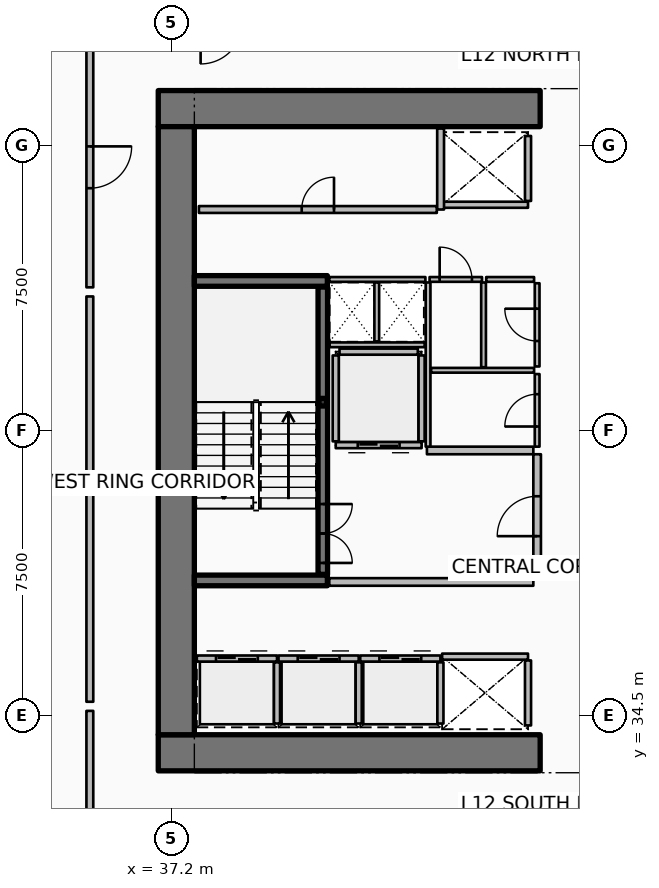
"""IFC4 building model, lengths in metres.
Left out: names, types, materials, properties, quantities, classifications, styles, units other than length and angle.
Written with IfcOpenShell. Run it as: python <this file> out.ifc"""

import sys

from ifc_helpers import new_model, si_unit, direction, frame, frame_2d, origin, origin_2d, place, context, subcontext, project, spatial, rectangle, hollow_rectangle, extrude, element, fill, save


model = new_model("IFC4")
c1 = context("Model", 3, precision=1e-05, world=origin(), true_north=direction((0.0, 1.0)))
c2 = subcontext(c1, "Body", "Model", "MODEL_VIEW")
j1 = project(units=[si_unit("LENGTHUNIT", "METRE"), si_unit("PLANEANGLEUNIT", "RADIAN")], contexts=[c1])
p1 = place(None, origin())
s1 = spatial("IfcSite", under=j1, at=p1, CompositionType="ELEMENT")
p2 = place(p1, origin())
s2 = spatial("IfcBuilding", under=s1, at=p2, CompositionType="ELEMENT")
p3 = place(p2, frame((0.0, 0.0, 52.65)))
s3 = spatial("IfcBuildingStorey", under=s2, at=p3, CompositionType="ELEMENT", Elevation=52.65)
for number, where, z_axis, x_axis in (
    (1, (36.85, 33.525, 0.0), (0.0, 0.0, 1.0), (1.0, 0.0, 0.0)),
    (2, (36.85, 50.475, 0.0), (0.0, 0.0, 1.0), (1.0, 0.0, 0.0)),
):
    element("IfcWall", number, at=place(p3, frame(where, z_axis=z_axis, x_axis=x_axis)), inside=s3, PredefinedType="SHEAR", context=c2, shape_type="SweptSolid", body=[
        extrude(rectangle(XDim=10.05, YDim=0.95, at=frame_2d((5.025, 0.0))), origin(), (0.0, 0.0, 1.0), 3.75),
    ])
p4 = place(p3, frame((37.325, 34.0, 0.0), z_axis=(0.0, 0.0, 1.0), x_axis=(0.0, 1.0, 0.0)))
e3 = element("IfcWall", 3, at=p4, inside=s3, PredefinedType="SHEAR", context=c2, shape_type="SweptSolid", body=[
    extrude(rectangle(XDim=16.0, YDim=0.95, at=frame_2d((8.0, 0.0))), origin(), (0.0, 0.0, 1.0), 3.75),
])
for number, where, z_axis, x_axis in (
    (4, (37.8, 38.06, 0.0), (0.0, 0.0, 1.0), (1.0, 0.0, 0.0)),
    (5, (37.8, 45.94, 0.0), (0.0, 0.0, 1.0), (1.0, 0.0, 0.0)),
):
    element("IfcWall", number, at=place(p3, frame(where, z_axis=z_axis, x_axis=x_axis)), inside=s3, PredefinedType="SHEAR", context=c2, shape_type="SweptSolid", body=[
        extrude(rectangle(XDim=3.5, YDim=0.28, at=frame_2d((1.75, 0.0))), origin(), (0.0, 0.0, 1.0), 3.75),
    ])
p5 = place(p3, frame((41.18, 42.75, 0.0), z_axis=(0.0, 0.0, 1.0), x_axis=(1.0, 0.0, 0.0)))
e6 = element("IfcColumn", 6, at=p5, inside=s3, PredefinedType="COLUMN", context=c2, shape_type="SweptSolid", body=[
    extrude(hollow_rectangle(XDim=0.2, YDim=0.2, WallThickness=0.01, InnerFilletRadius=0.01, OuterFilletRadius=0.02, at=origin_2d()), origin(), (0.0, 0.0, 1.0), 1.67),
])
p6 = place(p3, frame((41.18, 38.22, 0.0), z_axis=(0.0, 0.0, 1.0), x_axis=(0.0, 1.0, 0.0)))
e7 = element("IfcWall", 7, at=p6, inside=s3, PredefinedType="SOLIDWALL", context=c2, shape_type="SweptSolid", body=[
    extrude(rectangle(XDim=7.56, YDim=0.25, at=frame_2d((3.78, 0.0))), origin(), (0.0, 0.0, 1.0), 3.5),
])
p7 = place(p6, frame((0.3, 0.0, 0.0)))
e8 = element("IfcOpeningElement", 8, at=p7, cuts=e7, PredefinedType="OPENING", context=c2, shape_type="SweptSolid", body=[
    extrude(rectangle(XDim=1.55, YDim=2.15, at=frame_2d((0.775, 1.075))), frame((0.0, 0.135, 0.0), z_axis=(0.0, -1.0, 0.0), x_axis=(1.0, 0.0, 0.0)), (0.0, 0.0, 1.0), 0.27),
])
p8 = place(p3, frame((37.865, 36.005, 0.0), z_axis=(0.0, 0.0, 1.0), x_axis=(1.0, 0.0, 0.0)))
e9 = element("IfcWall", 9, at=p8, inside=s3, PredefinedType="PARTITIONING", context=c2, shape_type="SweptSolid", body=[
    extrude(rectangle(XDim=2.11, YDim=0.16, at=frame_2d((1.055, 0.0))), origin(), (0.0, 0.0, 1.0), 3.5),
])
p9 = place(p8, frame((0.505, 0.0, 0.0)))
e10 = element("IfcOpeningElement", 10, at=p9, cuts=e9, PredefinedType="OPENING", context=c2, shape_type="SweptSolid", body=[
    extrude(rectangle(XDim=1.1, YDim=2.1, at=frame_2d((0.55, 1.05))), frame((0.0, 0.09, 0.0), z_axis=(0.0, -1.0, 0.0), x_axis=(1.0, 0.0, 0.0)), (0.0, 0.0, 1.0), 0.18),
])
p10 = place(p3, frame((39.975, 34.295, 0.0), z_axis=(0.0, 0.0, 1.0), x_axis=(0.0, 1.0, 0.0)))
e11 = element("IfcWall", 11, at=p10, inside=s3, PredefinedType="PARTITIONING", context=c2, shape_type="SweptSolid", body=[
    extrude(rectangle(XDim=1.61, YDim=0.16, at=frame_2d((0.805, 0.0))), origin(), (0.0, 0.0, 1.0), 3.5),
])
p11 = place(p3, frame((40.015, 36.005, 0.0), z_axis=(0.0, 0.0, 1.0), x_axis=(1.0, 0.0, 0.0)))
e12 = element("IfcWall", 12, at=p11, inside=s3, PredefinedType="PARTITIONING", context=c2, shape_type="SweptSolid", body=[
    extrude(rectangle(XDim=2.11, YDim=0.16, at=frame_2d((1.055, 0.0))), origin(), (0.0, 0.0, 1.0), 3.5),
])
p12 = place(p11, frame((0.505, 0.0, 0.0)))
e13 = element("IfcOpeningElement", 13, at=p12, cuts=e12, PredefinedType="OPENING", context=c2, shape_type="SweptSolid", body=[
    extrude(rectangle(XDim=1.1, YDim=2.1, at=frame_2d((0.55, 1.05))), frame((0.0, 0.09, 0.0), z_axis=(0.0, -1.0, 0.0), x_axis=(1.0, 0.0, 0.0)), (0.0, 0.0, 1.0), 0.18),
])
p13 = place(p3, frame((42.125, 34.295, 0.0), z_axis=(0.0, 0.0, 1.0), x_axis=(0.0, 1.0, 0.0)))
e14 = element("IfcWall", 14, at=p13, inside=s3, PredefinedType="PARTITIONING", context=c2, shape_type="SweptSolid", body=[
    extrude(rectangle(XDim=1.61, YDim=0.16, at=frame_2d((0.805, 0.0))), origin(), (0.0, 0.0, 1.0), 3.5),
])
p14 = place(p3, frame((42.165, 36.005, 0.0), z_axis=(0.0, 0.0, 1.0), x_axis=(1.0, 0.0, 0.0)))
e15 = element("IfcWall", 15, at=p14, inside=s3, PredefinedType="PARTITIONING", context=c2, shape_type="SweptSolid", body=[
    extrude(rectangle(XDim=2.11, YDim=0.16, at=frame_2d((1.055, 0.0))), origin(), (0.0, 0.0, 1.0), 3.5),
])
p15 = place(p14, frame((0.505, 0.0, 0.0)))
e16 = element("IfcOpeningElement", 16, at=p15, cuts=e15, PredefinedType="OPENING", context=c2, shape_type="SweptSolid", body=[
    extrude(rectangle(XDim=1.1, YDim=2.1, at=frame_2d((0.55, 1.05))), frame((0.0, 0.09, 0.0), z_axis=(0.0, -1.0, 0.0), x_axis=(1.0, 0.0, 0.0)), (0.0, 0.0, 1.0), 0.18),
])
p16 = place(p3, frame((44.275, 34.295, 0.0), z_axis=(0.0, 0.0, 1.0), x_axis=(0.0, 1.0, 0.0)))
e17 = element("IfcWall", 17, at=p16, inside=s3, PredefinedType="PARTITIONING", context=c2, shape_type="SweptSolid", body=[
    extrude(rectangle(XDim=1.61, YDim=0.16, at=frame_2d((0.805, 0.0))), origin(), (0.0, 0.0, 1.0), 3.5),
])
p17 = place(p3, frame((46.58, 47.945, 0.0), z_axis=(0.0, 0.0, 1.0), x_axis=(-1.0, 0.0, 0.0)))
e18 = element("IfcWall", 18, at=p17, inside=s3, PredefinedType="PARTITIONING", context=c2, shape_type="SweptSolid", body=[
    extrude(rectangle(XDim=2.26, YDim=0.16, at=frame_2d((1.13, 0.0))), origin(), (0.0, 0.0, 1.0), 3.5),
])
p18 = place(p3, frame((46.58, 48.045, 0.0), z_axis=(0.0, 0.0, 1.0), x_axis=(0.0, 1.0, 0.0)))
e19 = element("IfcWall", 19, at=p18, inside=s3, PredefinedType="PARTITIONING", context=c2, shape_type="SweptSolid", body=[
    extrude(rectangle(XDim=1.71, YDim=0.16, at=frame_2d((0.855, 0.0))), origin(), (0.0, 0.0, 1.0), 3.5),
])
p19 = place(p3, frame((44.32, 36.055, 0.0), z_axis=(0.0, 0.0, 1.0), x_axis=(1.0, 0.0, 0.0)))
e20 = element("IfcWall", 20, at=p19, inside=s3, PredefinedType="PARTITIONING", context=c2, shape_type="SweptSolid", body=[
    extrude(rectangle(XDim=2.26, YDim=0.16, at=frame_2d((1.13, 0.0))), origin(), (0.0, 0.0, 1.0), 3.5),
])
p20 = place(p3, frame((46.58, 34.245, 0.0), z_axis=(0.0, 0.0, 1.0), x_axis=(0.0, 1.0, 0.0)))
e21 = element("IfcWall", 21, at=p20, inside=s3, PredefinedType="PARTITIONING", context=c2, shape_type="SweptSolid", body=[
    extrude(rectangle(XDim=1.71, YDim=0.16, at=frame_2d((0.855, 0.0))), origin(), (0.0, 0.0, 1.0), 3.5),
])
p21 = place(p3, frame((43.78, 41.62, 0.0), z_axis=(0.0, 0.0, 1.0), x_axis=(-1.0, 0.0, 0.0)))
e22 = element("IfcWall", 22, at=p21, inside=s3, PredefinedType="PARTITIONING", context=c2, shape_type="SweptSolid", body=[
    extrude(rectangle(XDim=2.26, YDim=0.16, at=frame_2d((1.13, 0.0))), origin(), (0.0, 0.0, 1.0), 3.5),
])
p22 = place(p21, frame((0.58, 0.0, 0.0)))
e23 = element("IfcOpeningElement", 23, at=p22, cuts=e22, PredefinedType="OPENING", context=c2, shape_type="SweptSolid", body=[
    extrude(rectangle(XDim=1.1, YDim=2.1, at=frame_2d((0.55, 1.05))), frame((0.0, 0.09, 0.0), z_axis=(0.0, -1.0, 0.0), x_axis=(1.0, 0.0, 0.0)), (0.0, 0.0, 1.0), 0.18),
])
for number, where, z_axis, x_axis in (
    (24, (43.78, 41.72, 0.0), (0.0, 0.0, 1.0), (0.0, 1.0, 0.0)),
    (25, (41.52, 41.72, 0.0), (0.0, 0.0, 1.0), (0.0, 1.0, 0.0)),
):
    element("IfcWall", number, at=place(p3, frame(where, z_axis=z_axis, x_axis=x_axis)), inside=s3, PredefinedType="PARTITIONING", context=c2, shape_type="SweptSolid", body=[
        extrude(rectangle(XDim=2.26, YDim=0.16, at=frame_2d((1.13, 0.0))), origin(), (0.0, 0.0, 1.0), 3.5),
    ])
p23 = place(p3, frame((41.62, 44.08, 0.0), z_axis=(0.0, 0.0, 1.0), x_axis=(1.0, 0.0, 0.0)))
e26 = element("IfcWall", 26, at=p23, inside=s3, PredefinedType="PARTITIONING", context=c2, shape_type="SweptSolid", body=[
    extrude(rectangle(XDim=2.06, YDim=0.16, at=frame_2d((1.03, 0.0))), origin(), (0.0, 0.0, 1.0), 3.5),
])
p24 = place(p3, frame((37.92, 47.82, 0.0), z_axis=(0.0, 0.0, 1.0), x_axis=(1.0, 0.0, 0.0)))
e27 = element("IfcWall", 27, at=p24, inside=s3, PredefinedType="PARTITIONING", context=c2, shape_type="SweptSolid", body=[
    extrude(rectangle(XDim=6.26, YDim=0.18, at=frame_2d((3.13, 0.0))), origin(), (0.0, 0.0, 1.0), 3.5),
])
p25 = place(p24, frame((2.705, 0.0, 0.0)))
e28 = element("IfcOpeningElement", 28, at=p25, cuts=e27, PredefinedType="OPENING", context=c2, shape_type="SweptSolid", body=[
    extrude(rectangle(XDim=0.85, YDim=2.06, at=frame_2d((0.425, 1.03))), frame((0.0, 0.1, 0.0), z_axis=(0.0, -1.0, 0.0), x_axis=(1.0, 0.0, 0.0)), (0.0, 0.0, 1.0), 0.2),
])
p26 = place(p3, frame((44.28, 47.82, 0.0), z_axis=(0.0, 0.0, 1.0), x_axis=(0.0, 1.0, 0.0)))
e29 = element("IfcWall", 29, at=p26, inside=s3, PredefinedType="PARTITIONING", context=c2, shape_type="SweptSolid", body=[
    extrude(rectangle(XDim=2.13, YDim=0.18, at=frame_2d((1.065, 0.0))), origin(), (0.0, 0.0, 1.0), 3.5),
])
p27 = place(p3, frame((41.35, 38.02, 0.0), z_axis=(0.0, 0.0, 1.0), x_axis=(1.0, 0.0, 0.0)))
e30 = element("IfcWall", 30, at=p27, inside=s3, PredefinedType="PARTITIONING", context=c2, shape_type="SweptSolid", body=[
    extrude(rectangle(XDim=5.37, YDim=0.2, at=frame_2d((2.685, 0.0))), origin(), (0.0, 0.0, 1.0), 3.5),
])
p28 = place(p3, frame((43.92, 41.48, 0.0), z_axis=(0.0, 0.0, 1.0), x_axis=(1.0, 0.0, 0.0)))
e31 = element("IfcWall", 31, at=p28, inside=s3, PredefinedType="PARTITIONING", context=c2, shape_type="SweptSolid", body=[
    extrude(rectangle(XDim=2.8, YDim=0.2, at=frame_2d((1.4, 0.0))), origin(), (0.0, 0.0, 1.0), 3.5),
])
p29 = place(p3, frame((46.82, 38.12, 0.0), z_axis=(0.0, 0.0, 1.0), x_axis=(0.0, 1.0, 0.0)))
e32 = element("IfcWall", 32, at=p29, inside=s3, PredefinedType="PARTITIONING", context=c2, shape_type="SweptSolid", body=[
    extrude(rectangle(XDim=3.26, YDim=0.2, at=frame_2d((1.63, 0.0))), origin(), (0.0, 0.0, 1.0), 3.5),
])
p30 = place(p29, frame((1.105, 0.0, 0.0)))
e33 = element("IfcOpeningElement", 33, at=p30, cuts=e32, PredefinedType="OPENING", context=c2, shape_type="SweptSolid", body=[
    extrude(rectangle(XDim=1.05, YDim=2.1, at=frame_2d((0.525, 1.05))), frame((0.0, 0.11, 0.0), z_axis=(0.0, -1.0, 0.0), x_axis=(1.0, 0.0, 0.0)), (0.0, 0.0, 1.0), 0.22),
])
p31 = place(p3, frame((41.36, 44.26, 0.0), z_axis=(0.0, 0.0, 1.0), x_axis=(1.0, 0.0, 0.0)))
e34 = element("IfcWall", 34, at=p31, inside=s3, PredefinedType="PARTITIONING", context=c2, shape_type="SweptSolid", body=[
    extrude(rectangle(XDim=2.5, YDim=0.125, at=frame_2d((1.25, 0.0))), origin(), (0.0, 0.0, 1.0), 2.94),
])
p32 = place(p3, frame((42.6, 44.35, 0.0), z_axis=(0.0, 0.0, 1.0), x_axis=(0.0, 1.0, 0.0)))
e35 = element("IfcWall", 35, at=p32, inside=s3, PredefinedType="PARTITIONING", context=c2, shape_type="SweptSolid", body=[
    extrude(rectangle(XDim=1.55, YDim=0.125, at=frame_2d((0.775, 0.0))), origin(), (0.0, 0.0, 1.0), 2.94),
])
p33 = place(p3, frame((43.95, 41.58, 0.0), z_axis=(0.0, 0.0, 1.0), x_axis=(0.0, 1.0, 0.0)))
e36 = element("IfcWall", 36, at=p33, inside=s3, PredefinedType="PARTITIONING", context=c2, shape_type="SweptSolid", body=[
    extrude(rectangle(XDim=4.32, YDim=0.125, at=frame_2d((2.16, 0.0))), origin(), (0.0, 0.0, 1.0), 2.94),
])
p34 = place(p3, frame((44.03, 43.59, 0.0), z_axis=(0.0, 0.0, 1.0), x_axis=(1.0, 0.0, 0.0)))
e37 = element("IfcWall", 37, at=p34, inside=s3, PredefinedType="PARTITIONING", context=c2, shape_type="SweptSolid", body=[
    extrude(rectangle(XDim=2.71, YDim=0.125, at=frame_2d((1.355, 0.0))), origin(), (0.0, 0.0, 1.0), 2.94),
])
p35 = place(p3, frame((45.41, 43.67, 0.0), z_axis=(0.0, 0.0, 1.0), x_axis=(0.0, 1.0, 0.0)))
e38 = element("IfcWall", 38, at=p35, inside=s3, PredefinedType="PARTITIONING", context=c2, shape_type="SweptSolid", body=[
    extrude(rectangle(XDim=2.23, YDim=0.125, at=frame_2d((1.115, 0.0))), origin(), (0.0, 0.0, 1.0), 2.94),
])
p36 = place(p3, frame((46.82, 41.58, 0.0), z_axis=(0.0, 0.0, 1.0), x_axis=(0.0, 1.0, 0.0)))
e39 = element("IfcWall", 39, at=p36, inside=s3, PredefinedType="PARTITIONING", context=c2, shape_type="SweptSolid", body=[
    extrude(rectangle(XDim=1.91, YDim=0.125, at=frame_2d((0.955, 0.0))), origin(), (0.0, 0.0, 1.0), 2.94),
])
p37 = place(p36, frame((0.53, 0.0, 0.0)))
e40 = element("IfcOpeningElement", 40, at=p37, cuts=e39, PredefinedType="OPENING", context=c2, shape_type="SweptSolid", body=[
    extrude(rectangle(XDim=0.85, YDim=2.06, at=frame_2d((0.425, 1.03))), frame((0.0, 0.073, 0.0), z_axis=(0.0, -1.0, 0.0), x_axis=(1.0, 0.0, 0.0)), (0.0, 0.0, 1.0), 0.145),
])
p38 = place(p3, frame((46.82, 43.69, 0.0), z_axis=(0.0, 0.0, 1.0), x_axis=(0.0, 1.0, 0.0)))
e41 = element("IfcWall", 41, at=p38, inside=s3, PredefinedType="PARTITIONING", context=c2, shape_type="SweptSolid", body=[
    extrude(rectangle(XDim=2.19, YDim=0.125, at=frame_2d((1.095, 0.0))), origin(), (0.0, 0.0, 1.0), 2.94),
])
p39 = place(p38, frame((0.67, 0.0, 0.0)))
e42 = element("IfcOpeningElement", 42, at=p39, cuts=e41, PredefinedType="OPENING", context=c2, shape_type="SweptSolid", body=[
    extrude(rectangle(XDim=0.85, YDim=2.06, at=frame_2d((0.425, 1.03))), frame((0.0, 0.073, 0.0), z_axis=(0.0, -1.0, 0.0), x_axis=(1.0, 0.0, 0.0)), (0.0, 0.0, 1.0), 0.145),
])
p40 = place(p3, frame((41.35, 45.98, 0.0), z_axis=(0.0, 0.0, 1.0), x_axis=(1.0, 0.0, 0.0)))
e43 = element("IfcWall", 43, at=p40, inside=s3, PredefinedType="PARTITIONING", context=c2, shape_type="SweptSolid", body=[
    extrude(rectangle(XDim=2.53, YDim=0.125, at=frame_2d((1.265, 0.0))), origin(), (0.0, 0.0, 1.0), 2.94),
])
p41 = place(p3, frame((43.99, 45.98, 0.0), z_axis=(0.0, 0.0, 1.0), x_axis=(1.0, 0.0, 0.0)))
e44 = element("IfcWall", 44, at=p41, inside=s3, PredefinedType="PARTITIONING", context=c2, shape_type="SweptSolid", body=[
    extrude(rectangle(XDim=1.38, YDim=0.125, at=frame_2d((0.69, 0.0))), origin(), (0.0, 0.0, 1.0), 2.94),
])
p42 = place(p41, frame((0.265, 0.0, 0.0)))
e45 = element("IfcOpeningElement", 45, at=p42, cuts=e44, PredefinedType="OPENING", context=c2, shape_type="SweptSolid", body=[
    extrude(rectangle(XDim=0.85, YDim=2.06, at=frame_2d((0.425, 1.03))), frame((0.0, 0.073, 0.0), z_axis=(0.0, -1.0, 0.0), x_axis=(1.0, 0.0, 0.0)), (0.0, 0.0, 1.0), 0.145),
])
p43 = place(p3, frame((45.48, 45.98, 0.0), z_axis=(0.0, 0.0, 1.0), x_axis=(1.0, 0.0, 0.0)))
e46 = element("IfcWall", 46, at=p43, inside=s3, PredefinedType="PARTITIONING", context=c2, shape_type="SweptSolid", body=[
    extrude(rectangle(XDim=1.26, YDim=0.125, at=frame_2d((0.63, 0.0))), origin(), (0.0, 0.0, 1.0), 2.94),
])
p44 = place(p3, frame((35.05, 52.089, 0.0), z_axis=(0.0, 0.0, 1.0), x_axis=(0.0, -1.0, 0.0)))
e47 = element("IfcWall", 47, at=p44, inside=s3, PredefinedType="PARTITIONING", context=c2, shape_type="SweptSolid", body=[
    extrude(rectangle(XDim=6.317, YDim=0.18, at=frame_2d((3.158, 0.0))), origin(), (0.0, 0.0, 1.0), 2.867),
])
p45 = place(p44, frame((2.608, 0.0, 0.0)))
e48 = element("IfcOpeningElement", 48, at=p45, cuts=e47, PredefinedType="OPENING", context=c2, shape_type="SweptSolid", body=[
    extrude(rectangle(XDim=1.1, YDim=2.1, at=frame_2d((0.55, 1.05))), frame((0.0, 0.1, 0.0), z_axis=(0.0, -1.0, 0.0), x_axis=(1.0, 0.0, 0.0)), (0.0, 0.0, 1.0), 0.2),
])
p46 = place(p3, frame((35.05, 45.532, 0.0), z_axis=(0.0, 0.0, 1.0), x_axis=(0.0, -1.0, 0.0)))
e49 = element("IfcWall", 49, at=p46, inside=s3, PredefinedType="PARTITIONING", context=c2, shape_type="SweptSolid", body=[
    extrude(rectangle(XDim=4.945, YDim=0.18, at=frame_2d((2.472, 0.0))), origin(), (0.0, 0.0, 1.0), 2.867),
])
p47 = place(p3, frame((35.05, 40.347, 0.0), z_axis=(0.0, 0.0, 1.0), x_axis=(0.0, -1.0, 0.0)))
e50 = element("IfcWall", 50, at=p47, inside=s3, PredefinedType="PARTITIONING", context=c2, shape_type="SweptSolid", body=[
    extrude(rectangle(XDim=5.48, YDim=0.18, at=frame_2d((2.74, 0.0))), origin(), (0.0, 0.0, 1.0), 2.867),
])
p48 = place(p3, frame((35.05, 34.628, 0.0), z_axis=(0.0, 0.0, 1.0), x_axis=(0.0, -1.0, 0.0)))
e51 = element("IfcWall", 51, at=p48, inside=s3, PredefinedType="PARTITIONING", context=c2, shape_type="SweptSolid", body=[
    extrude(rectangle(XDim=3.258, YDim=0.18, at=frame_2d((1.629, 0.0))), origin(), (0.0, 0.0, 1.0), 2.867),
])
p49 = place(p7, origin())
e52 = element("IfcDoor", 52, at=p49, inside=s3, OperationType="DOUBLE_DOOR_SINGLE_SWING", PredefinedType="DOOR", context=c2, shape_type="SweptSolid", body=[
    extrude(rectangle(XDim=1.55, YDim=2.15, at=frame_2d((0.775, 1.075))), frame((0.0, 0.025, 0.0), z_axis=(0.0, -1.0, 0.0), x_axis=(1.0, 0.0, 0.0)), (0.0, 0.0, 1.0), 0.05),
])
fill(e8, e52)
p50 = place(p9, origin())
e53 = element("IfcDoor", 53, at=p50, inside=s3, OperationType="DOUBLE_DOOR_SLIDING", PredefinedType="DOOR", context=c2, shape_type="SweptSolid", body=[
    extrude(rectangle(XDim=1.1, YDim=2.1, at=frame_2d((0.55, 1.05))), frame((0.0, 0.025, 0.0), z_axis=(0.0, -1.0, 0.0), x_axis=(1.0, 0.0, 0.0)), (0.0, 0.0, 1.0), 0.05),
])
fill(e10, e53)
p51 = place(p12, origin())
e54 = element("IfcDoor", 54, at=p51, inside=s3, OperationType="DOUBLE_DOOR_SLIDING", PredefinedType="DOOR", context=c2, shape_type="SweptSolid", body=[
    extrude(rectangle(XDim=1.1, YDim=2.1, at=frame_2d((0.55, 1.05))), frame((0.0, 0.025, 0.0), z_axis=(0.0, -1.0, 0.0), x_axis=(1.0, 0.0, 0.0)), (0.0, 0.0, 1.0), 0.05),
])
fill(e13, e54)
p52 = place(p15, origin())
e55 = element("IfcDoor", 55, at=p52, inside=s3, OperationType="DOUBLE_DOOR_SLIDING", PredefinedType="DOOR", context=c2, shape_type="SweptSolid", body=[
    extrude(rectangle(XDim=1.1, YDim=2.1, at=frame_2d((0.55, 1.05))), frame((0.0, 0.025, 0.0), z_axis=(0.0, -1.0, 0.0), x_axis=(1.0, 0.0, 0.0)), (0.0, 0.0, 1.0), 0.05),
])
fill(e16, e55)
p53 = place(p22, origin())
e56 = element("IfcDoor", 56, at=p53, inside=s3, OperationType="DOUBLE_DOOR_SLIDING", PredefinedType="DOOR", context=c2, shape_type="SweptSolid", body=[
    extrude(rectangle(XDim=1.1, YDim=2.1, at=frame_2d((0.55, 1.05))), frame((0.0, 0.025, 0.0), z_axis=(0.0, -1.0, 0.0), x_axis=(1.0, 0.0, 0.0)), (0.0, 0.0, 1.0), 0.05),
])
fill(e23, e56)
p54 = place(p25, origin())
e57 = element("IfcDoor", 57, at=p54, inside=s3, OperationType="SINGLE_SWING_RIGHT", PredefinedType="DOOR", context=c2, shape_type="SweptSolid", body=[
    extrude(rectangle(XDim=0.85, YDim=2.06, at=frame_2d((0.425, 1.03))), frame((0.0, 0.025, 0.0), z_axis=(0.0, -1.0, 0.0), x_axis=(1.0, 0.0, 0.0)), (0.0, 0.0, 1.0), 0.05),
])
fill(e28, e57)
p55 = place(p30, origin())
e58 = element("IfcDoor", 58, at=p55, inside=s3, OperationType="SINGLE_SWING_LEFT", PredefinedType="DOOR", context=c2, shape_type="SweptSolid", body=[
    extrude(rectangle(XDim=1.05, YDim=2.1, at=frame_2d((0.525, 1.05))), frame((0.0, 0.025, 0.0), z_axis=(0.0, -1.0, 0.0), x_axis=(1.0, 0.0, 0.0)), (0.0, 0.0, 1.0), 0.05),
])
fill(e33, e58)
p56 = place(p37, origin())
e59 = element("IfcDoor", 59, at=p56, inside=s3, OperationType="SINGLE_SWING_LEFT", PredefinedType="DOOR", context=c2, shape_type="SweptSolid", body=[
    extrude(rectangle(XDim=0.85, YDim=2.06, at=frame_2d((0.425, 1.03))), frame((0.0, 0.025, 0.0), z_axis=(0.0, -1.0, 0.0), x_axis=(1.0, 0.0, 0.0)), (0.0, 0.0, 1.0), 0.05),
])
fill(e40, e59)
p57 = place(p39, origin())
e60 = element("IfcDoor", 60, at=p57, inside=s3, OperationType="SINGLE_SWING_RIGHT", PredefinedType="DOOR", context=c2, shape_type="SweptSolid", body=[
    extrude(rectangle(XDim=0.85, YDim=2.06, at=frame_2d((0.425, 1.03))), frame((0.0, 0.025, 0.0), z_axis=(0.0, -1.0, 0.0), x_axis=(1.0, 0.0, 0.0)), (0.0, 0.0, 1.0), 0.05),
])
fill(e42, e60)
p58 = place(p42, origin())
e61 = element("IfcDoor", 61, at=p58, inside=s3, OperationType="SINGLE_SWING_LEFT", PredefinedType="DOOR", context=c2, shape_type="SweptSolid", body=[
    extrude(rectangle(XDim=0.85, YDim=2.06, at=frame_2d((0.425, 1.03))), frame((0.0, 0.025, 0.0), z_axis=(0.0, -1.0, 0.0), x_axis=(1.0, 0.0, 0.0)), (0.0, 0.0, 1.0), 0.05),
])
fill(e45, e61)
p59 = place(p45, origin())
e62 = element("IfcDoor", 62, at=p59, inside=s3, OperationType="SINGLE_SWING_LEFT", PredefinedType="DOOR", context=c2, shape_type="SweptSolid", body=[
    extrude(rectangle(XDim=1.1, YDim=2.1, at=frame_2d((0.55, 1.05))), frame((0.0, 0.025, 0.0), z_axis=(0.0, -1.0, 0.0), x_axis=(1.0, 0.0, 0.0)), (0.0, 0.0, 1.0), 0.05),
])
fill(e48, e62)
save(model, sys.argv[1])
